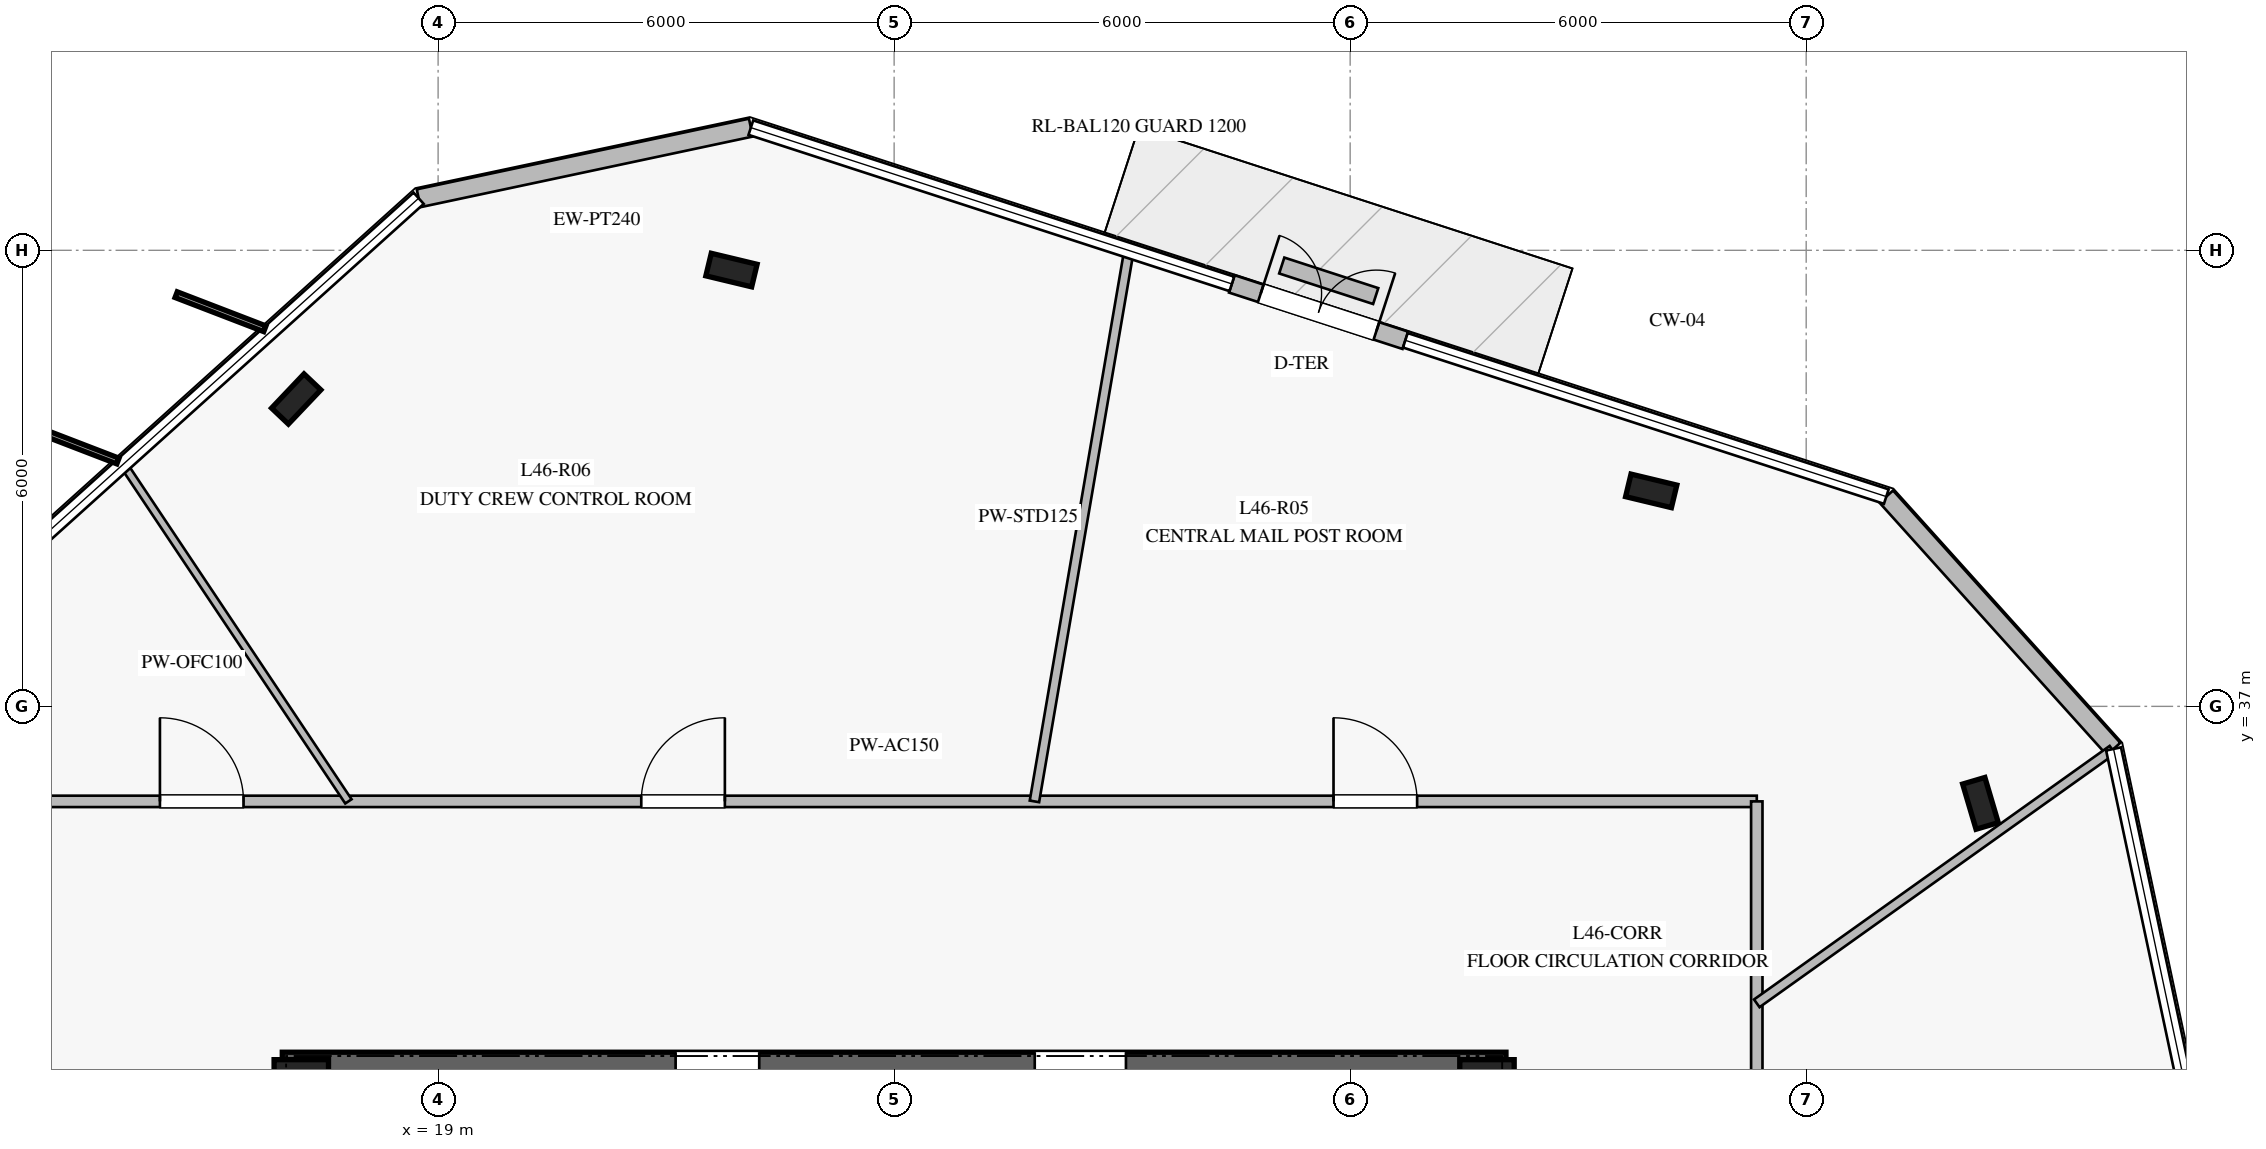
"""IFC4 building model, lengths in metres.
Left out: names, types, materials, properties, quantities, classifications, styles, units other than length and angle.
Written with IfcOpenShell. Run it as: python <this file> out.ifc"""

import sys

from ifc_helpers import new_model, si_unit, direction, frame, frame_2d, origin, origin_2d, place, context, subcontext, project, spatial, rectangle, i_section, extrude, element, fill, save


model = new_model("IFC4")
c1 = context("Model", 3, precision=1e-05, world=origin(), true_north=direction((0.0, 1.0)))
c2 = subcontext(c1, "Body", "Model", "MODEL_VIEW")
j1 = project(units=[si_unit("LENGTHUNIT", "METRE"), si_unit("PLANEANGLEUNIT", "RADIAN")], contexts=[c1])
p1 = place(None, origin())
s1 = spatial("IfcSite", under=j1, at=p1, CompositionType="ELEMENT")
p2 = place(p1, origin())
s2 = spatial("IfcBuilding", under=s1, at=p2, CompositionType="ELEMENT")
p3 = place(p2, frame((0.0, 0.0, 192.8)))
s3 = spatial("IfcBuildingStorey", under=s2, at=p3, CompositionType="ELEMENT", Elevation=192.8)
p4 = place(p3, frame((33.05, 32.2, 0.0), z_axis=(0.0, 0.0, 1.0), x_axis=(-1.0, 0.0, 0.0)))
e1 = element("IfcWall", 1, at=p4, inside=s3, PredefinedType="SHEAR", context=c2, shape_type="SweptSolid", body=[
    extrude(rectangle(XDim=16.1, YDim=0.5, at=frame_2d((8.05, 0.0))), origin(), (0.0, 0.0, 1.0), 3.78),
])
p5 = place(p4, frame((5.0, 0.0, 0.0)))
e2 = element("IfcOpeningElement", 2, at=p5, cuts=e1, PredefinedType="OPENING", context=c2, shape_type="SweptSolid", body=[
    extrude(rectangle(XDim=1.2, YDim=2.25, at=frame_2d((0.6, 1.125))), frame((0.0, 0.26, 0.0), z_axis=(0.0, -1.0, 0.0), x_axis=(1.0, 0.0, 0.0)), (0.0, 0.0, 1.0), 0.52),
])
p6 = place(p4, frame((9.825, 0.0, 0.0)))
e3 = element("IfcOpeningElement", 3, at=p6, cuts=e1, PredefinedType="OPENING", context=c2, shape_type="SweptSolid", body=[
    extrude(rectangle(XDim=1.1, YDim=2.2, at=frame_2d((0.55, 1.1))), frame((0.0, 0.26, 0.0), z_axis=(0.0, -1.0, 0.0), x_axis=(1.0, 0.0, 0.0)), (0.0, 0.0, 1.0), 0.52),
])
for number, where, z_axis, x_axis in (
    (4, (32.8, 32.2, 0.0), (0.0, 0.0, 1.0), (1.0, 0.0, 0.0)),
    (5, (17.2, 32.2, 0.0), (0.0, 0.0, 1.0), (1.0, 0.0, 0.0)),
):
    element("IfcColumn", number, at=place(p3, frame(where, z_axis=z_axis, x_axis=x_axis)), inside=s3, PredefinedType="COLUMN", context=c2, shape_type="SweptSolid", body=[
        extrude(i_section(OverallWidth=0.304, OverallDepth=0.716, WebThickness=0.021, FlangeThickness=0.04, at=origin_2d()), origin(), (0.0, 0.0, 1.0), 4.0),
    ])
for number, where, z_axis, x_axis in (
    (6, (34.961, 39.835, 0.0), (0.0, 0.0, 1.0), (-0.972, 0.233, 0.0)),
    (7, (22.86, 42.74, 0.0), (0.0, 0.0, 1.0), (-0.972, 0.233, 0.0)),
    (8, (17.133, 41.044, 0.0), (0.0, 0.0, 1.0), (0.688, 0.725, 0.0)),
    (9, (39.293, 35.724, 0.0), (0.0, 0.0, 1.0), (-0.284, 0.959, 0.0)),
):
    element("IfcColumn", number, at=place(p3, frame(where, z_axis=z_axis, x_axis=x_axis)), inside=s3, PredefinedType="COLUMN", context=c2, shape_type="SweptSolid", body=[
        extrude(i_section(OverallWidth=0.305, OverallDepth=0.62, WebThickness=0.021, FlangeThickness=0.04, at=origin_2d()), origin(), (0.0, 0.0, 1.0), 4.0),
    ])
p7 = place(p3, frame((31.726, 41.816, 0.0), z_axis=(0.0, 0.0, 1.0), x_axis=(-0.951006411901, 0.309171157328, 0.0)))
e10 = element("IfcWall", 10, at=p7, inside=s3, PredefinedType="STANDARD", context=c2, shape_type="SweptSolid", body=[
    extrude(rectangle(XDim=2.401, YDim=0.24, at=frame_2d((1.2, 0.0))), origin(), (0.0, 0.0, 1.0), 3.78),
])
p8 = place(p7, frame((0.4, 0.0, 0.0)))
e11 = element("IfcOpeningElement", 11, at=p8, cuts=e10, PredefinedType="OPENING", context=c2, shape_type="SweptSolid", body=[
    extrude(rectangle(XDim=1.6, YDim=2.25, at=frame_2d((0.8, 1.125))), frame((0.0, 0.13, 0.0), z_axis=(0.0, -1.0, 0.0), x_axis=(1.0, 0.0, 0.0)), (0.0, 0.0, 1.0), 0.26),
])
p9 = place(p3, frame((23.115, 44.614, 0.0), z_axis=(0.0, 0.0, 1.0), x_axis=(-0.978154407503, -0.20787966491, 0.0)))
e12 = element("IfcWall", 12, at=p9, inside=s3, PredefinedType="STANDARD", context=c2, shape_type="SweptSolid", body=[
    extrude(rectangle(XDim=4.469, YDim=0.24, at=frame_2d((2.234, 0.0))), origin(), (0.0, 0.0, 1.0), 3.78),
])
p10 = place(p3, frame((41.044, 36.44, 0.0), z_axis=(0.0, 0.0, 1.0), x_axis=(-0.669203190827, 0.74307946371, 0.0)))
e13 = element("IfcWall", 13, at=p10, inside=s3, PredefinedType="STANDARD", context=c2, shape_type="SweptSolid", body=[
    extrude(rectangle(XDim=4.468, YDim=0.24, at=frame_2d((2.234, 0.0))), origin(), (0.0, 0.0, 1.0), 3.78),
])
p11 = place(p3, frame((31.336, 42.398, 0.0), z_axis=(0.0, 0.0, 1.0), x_axis=(-0.950931858287, 0.309400389293, 0.0)))
e14 = element("IfcWall", 14, at=p11, inside=s3, PredefinedType="USERDEFINED", context=c2, shape_type="SweptSolid", body=[
    extrude(rectangle(XDim=1.3, YDim=0.22, at=frame_2d((0.65, 0.0))), origin(), (0.0, 0.0, 1.0), 0.4),
])
p12 = place(p3, frame((13.65, 35.75, 0.0), z_axis=(0.0, 0.0, 1.0), x_axis=(1.0, 0.0, 0.0)))
e15 = element("IfcWall", 15, at=p12, inside=s3, PredefinedType="PARTITIONING", context=c2, shape_type="SweptSolid", body=[
    extrude(rectangle(XDim=22.7, YDim=0.15, at=frame_2d((11.35, 0.0))), origin(), (0.0, 0.0, 1.0), 3.05),
])
p13 = place(p12, frame((17.131, 0.0, 0.0)))
e16 = element("IfcOpeningElement", 16, at=p13, cuts=e15, PredefinedType="OPENING", context=c2, shape_type="SweptSolid", body=[
    extrude(rectangle(XDim=1.1, YDim=2.2, at=frame_2d((0.55, 1.1))), frame((0.0, 0.085, 0.0), z_axis=(0.0, -1.0, 0.0), x_axis=(1.0, 0.0, 0.0)), (0.0, 0.0, 1.0), 0.17),
])
p14 = place(p12, frame((8.023, 0.0, 0.0)))
e17 = element("IfcOpeningElement", 17, at=p14, cuts=e15, PredefinedType="OPENING", context=c2, shape_type="SweptSolid", body=[
    extrude(rectangle(XDim=1.1, YDim=2.2, at=frame_2d((0.55, 1.1))), frame((0.0, 0.085, 0.0), z_axis=(0.0, -1.0, 0.0), x_axis=(1.0, 0.0, 0.0)), (0.0, 0.0, 1.0), 0.17),
])
p15 = place(p12, frame((1.69, 0.0, 0.0)))
e18 = element("IfcOpeningElement", 18, at=p15, cuts=e15, PredefinedType="OPENING", context=c2, shape_type="SweptSolid", body=[
    extrude(rectangle(XDim=1.1, YDim=2.2, at=frame_2d((0.55, 1.1))), frame((0.0, 0.085, 0.0), z_axis=(0.0, -1.0, 0.0), x_axis=(1.0, 0.0, 0.0)), (0.0, 0.0, 1.0), 0.17),
])
p16 = place(p3, frame((36.35, 35.75, 0.0), z_axis=(0.0, 0.0, 1.0), x_axis=(0.0, -1.0, 0.0)))
e19 = element("IfcWall", 19, at=p16, inside=s3, PredefinedType="PARTITIONING", context=c2, shape_type="SweptSolid", body=[
    extrude(rectangle(XDim=21.5, YDim=0.15, at=frame_2d((10.75, 0.0))), origin(), (0.0, 0.0, 1.0), 3.05),
])
p17 = place(p16, frame((16.462, 0.0, 0.0)))
e20 = element("IfcOpeningElement", 20, at=p17, cuts=e19, PredefinedType="OPENING", context=c2, shape_type="SweptSolid", body=[
    extrude(rectangle(XDim=1.1, YDim=2.2, at=frame_2d((0.55, 1.1))), frame((0.0, 0.085, 0.0), z_axis=(0.0, -1.0, 0.0), x_axis=(1.0, 0.0, 0.0)), (0.0, 0.0, 1.0), 0.17),
])
p18 = place(p16, frame((7.196, 0.0, 0.0)))
e21 = element("IfcOpeningElement", 21, at=p18, cuts=e19, PredefinedType="OPENING", context=c2, shape_type="SweptSolid", body=[
    extrude(rectangle(XDim=1.1, YDim=2.2, at=frame_2d((0.55, 1.1))), frame((0.0, 0.085, 0.0), z_axis=(0.0, -1.0, 0.0), x_axis=(1.0, 0.0, 0.0)), (0.0, 0.0, 1.0), 0.17),
])
p19 = place(p3, frame((26.846, 35.75, 0.0), z_axis=(0.0, 0.0, 1.0), x_axis=(0.169145765644, 0.985591046005, 0.0)))
e22 = element("IfcWall", 22, at=p19, inside=s3, PredefinedType="PARTITIONING", context=c2, shape_type="SweptSolid", body=[
    extrude(rectangle(XDim=7.337, YDim=0.125, at=frame_2d((3.668, 0.0))), origin(), (0.0, 0.0, 1.0), 3.18),
])
p20 = place(p3, frame((17.82, 35.75, 0.0), z_axis=(0.0, 0.0, 1.0), x_axis=(-0.555462961573, 0.831541278783, 0.0)))
e23 = element("IfcWall", 23, at=p20, inside=s3, PredefinedType="MOVABLE", context=c2, shape_type="SweptSolid", body=[
    extrude(rectangle(XDim=5.316, YDim=0.1, at=frame_2d((2.658, 0.0))), origin(), (0.0, 0.0, 1.0), 3.05),
])
p21 = place(p3, frame((36.35, 33.093, 0.0), z_axis=(0.0, 0.0, 1.0), x_axis=(0.814241268053, 0.58052662075, 0.0)))
e24 = element("IfcWall", 24, at=p21, inside=s3, PredefinedType="PARTITIONING", context=c2, shape_type="SweptSolid", body=[
    extrude(rectangle(XDim=5.746, YDim=0.125, at=frame_2d((2.873, 0.0))), origin(), (0.0, 0.0, 1.0), 3.18),
])
p22 = place(p8, frame((1.6, 0.0, 0.0), z_axis=(0.0, 0.0, 1.0), x_axis=(-1.0, 0.0, 0.0)))
e25 = element("IfcDoor", 25, at=p22, inside=s3, OperationType="DOUBLE_DOOR_SINGLE_SWING", PredefinedType="DOOR", context=c2, shape_type="SweptSolid", body=[
    extrude(rectangle(XDim=1.6, YDim=2.25, at=frame_2d((0.8, 1.125))), frame((0.0, 0.025, 0.0), z_axis=(0.0, -1.0, 0.0), x_axis=(1.0, 0.0, 0.0)), (0.0, 0.0, 1.0), 0.05),
])
fill(e11, e25)
p23 = place(p5, origin())
e26 = element("IfcDoor", 26, at=p23, inside=s3, OperationType="SINGLE_SWING_LEFT", PredefinedType="DOOR", context=c2, shape_type="SweptSolid", body=[
    extrude(rectangle(XDim=1.2, YDim=2.25, at=frame_2d((0.6, 1.125))), frame((0.0, 0.025, 0.0), z_axis=(0.0, -1.0, 0.0), x_axis=(1.0, 0.0, 0.0)), (0.0, 0.0, 1.0), 0.05),
])
fill(e2, e26)
p24 = place(p6, origin())
e27 = element("IfcDoor", 27, at=p24, inside=s3, OperationType="SINGLE_SWING_RIGHT", PredefinedType="DOOR", context=c2, shape_type="SweptSolid", body=[
    extrude(rectangle(XDim=1.1, YDim=2.2, at=frame_2d((0.55, 1.1))), frame((0.0, 0.025, 0.0), z_axis=(0.0, -1.0, 0.0), x_axis=(1.0, 0.0, 0.0)), (0.0, 0.0, 1.0), 0.05),
])
fill(e3, e27)
p25 = place(p13, origin())
e28 = element("IfcDoor", 28, at=p25, inside=s3, OperationType="SINGLE_SWING_LEFT", PredefinedType="DOOR", context=c2, shape_type="SweptSolid", body=[
    extrude(rectangle(XDim=1.1, YDim=2.2, at=frame_2d((0.55, 1.1))), frame((0.0, 0.025, 0.0), z_axis=(0.0, -1.0, 0.0), x_axis=(1.0, 0.0, 0.0)), (0.0, 0.0, 1.0), 0.05),
])
fill(e16, e28)
p26 = place(p14, origin())
e29 = element("IfcDoor", 29, at=p26, inside=s3, OperationType="SINGLE_SWING_RIGHT", PredefinedType="DOOR", context=c2, shape_type="SweptSolid", body=[
    extrude(rectangle(XDim=1.1, YDim=2.2, at=frame_2d((0.55, 1.1))), frame((0.0, 0.025, 0.0), z_axis=(0.0, -1.0, 0.0), x_axis=(1.0, 0.0, 0.0)), (0.0, 0.0, 1.0), 0.05),
])
fill(e17, e29)
p27 = place(p15, origin())
e30 = element("IfcDoor", 30, at=p27, inside=s3, OperationType="SINGLE_SWING_LEFT", PredefinedType="DOOR", context=c2, shape_type="SweptSolid", body=[
    extrude(rectangle(XDim=1.1, YDim=2.2, at=frame_2d((0.55, 1.1))), frame((0.0, 0.025, 0.0), z_axis=(0.0, -1.0, 0.0), x_axis=(1.0, 0.0, 0.0)), (0.0, 0.0, 1.0), 0.05),
])
fill(e18, e30)
save(model, sys.argv[1])
